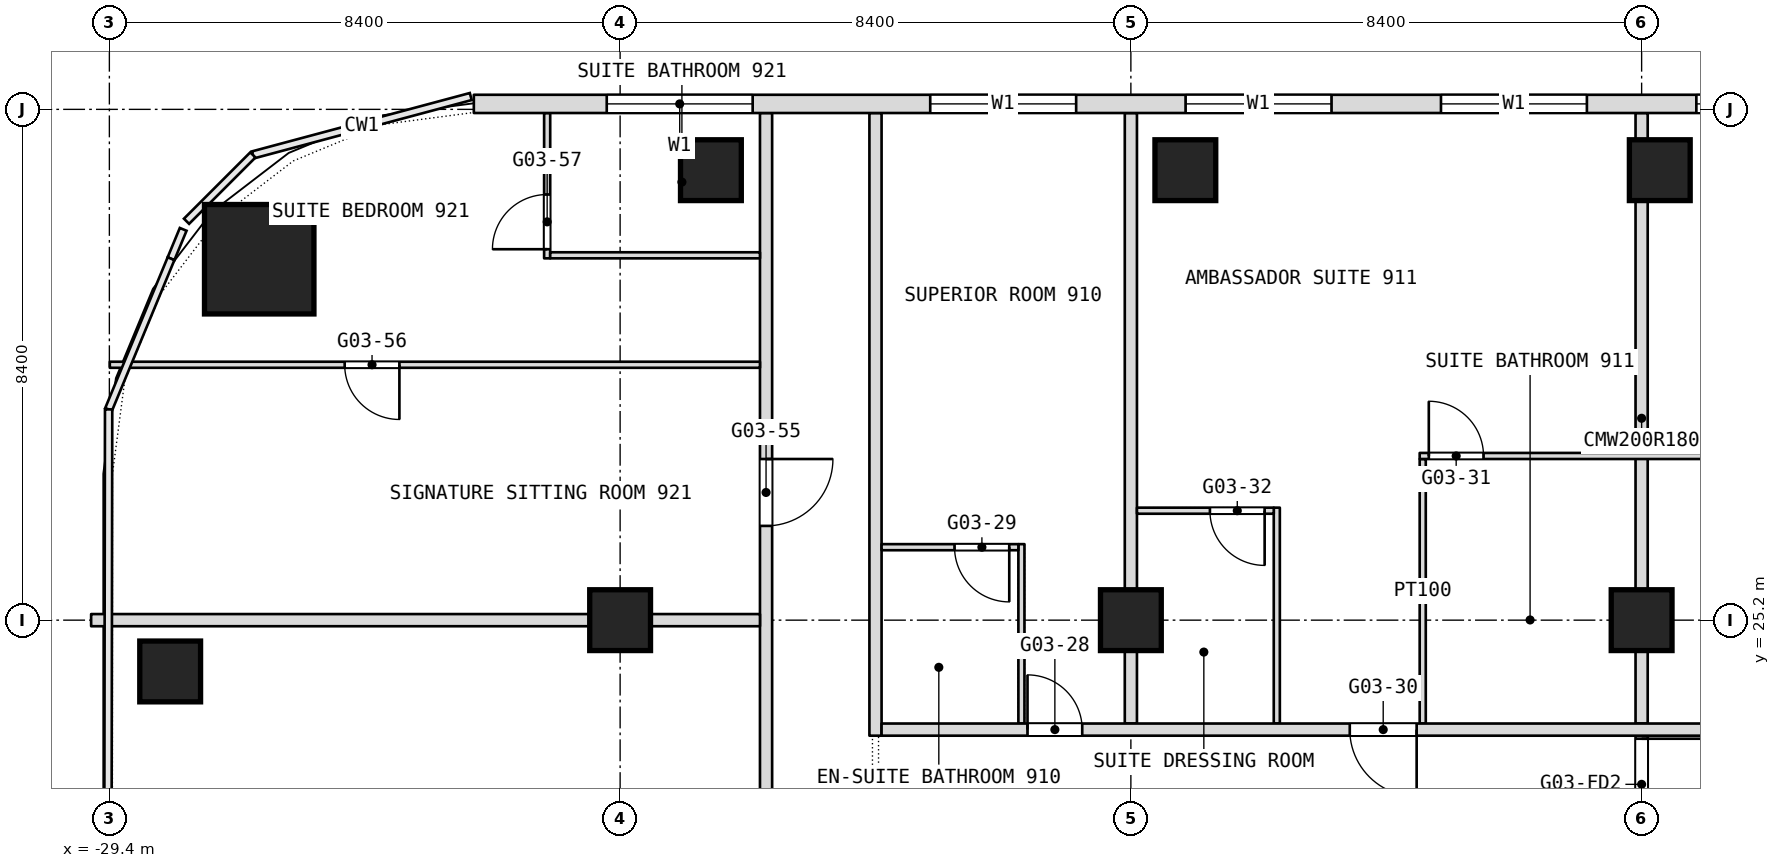
"""IFC4 building model, lengths in metres.
Left out: names, types, materials, properties, quantities, classifications, styles, units other than length and angle.
Written with IfcOpenShell. Run it as: python <this file> out.ifc"""

import sys

from ifc_helpers import new_model, si_unit, direction, frame, frame_2d, origin, origin_2d, place, context, subcontext, project, spatial, rectangle, extrude, element, fill, save


model = new_model("IFC4")
c1 = context("Model", 3, precision=1e-05, world=origin(), true_north=direction((0.0, 1.0)))
c2 = subcontext(c1, "Body", "Model", "MODEL_VIEW")
j1 = project(units=[si_unit("LENGTHUNIT", "METRE"), si_unit("PLANEANGLEUNIT", "RADIAN")], contexts=[c1])
p1 = place(None, origin())
s1 = spatial("IfcSite", under=j1, at=p1, CompositionType="ELEMENT")
p2 = place(p1, origin())
s2 = spatial("IfcBuilding", under=s1, at=p2, CompositionType="ELEMENT")
p3 = place(p2, frame((0.0, 0.0, 47.3)))
s3 = spatial("IfcBuildingStorey", under=s2, at=p3, CompositionType="ELEMENT", Elevation=47.3)
p4 = place(p3, frame((-26.936, 31.135, 0.0), z_axis=(0.0, 0.0, 1.0), x_axis=(1.0, 0.0, 0.0)))
e1 = element("IfcColumn", 1, at=p4, inside=s3, PredefinedType="COLUMN", context=c2, shape_type="SweptSolid", body=[
    extrude(rectangle(XDim=1.8, YDim=1.8, at=origin_2d()), origin(), (0.0, 0.0, 1.0), 3.6),
])
for number, where, z_axis, x_axis in (
    (2, (-21.0, 25.2, 0.0), (0.0, 0.0, 1.0), (1.0, 0.0, 0.0)),
    (3, (-12.6, 25.2, 0.0), (0.0, 0.0, 1.0), (1.0, 0.0, 0.0)),
    (4, (-4.2, 25.2, 0.0), (0.0, 0.0, 1.0), (1.0, 0.0, 0.0)),
    (5, (-28.4, 24.356, 0.0), (0.0, 0.0, 1.0), (1.0, 0.0, 0.0)),
    (6, (-19.507, 32.6, 0.0), (0.0, 0.0, 1.0), (1.0, 0.0, 0.0)),
    (7, (-11.704, 32.6, 0.0), (0.0, 0.0, 1.0), (1.0, 0.0, 0.0)),
    (8, (-3.901, 32.6, 0.0), (0.0, 0.0, 1.0), (1.0, 0.0, 0.0)),
):
    element("IfcColumn", number, at=place(p3, frame(where, z_axis=z_axis, x_axis=x_axis)), inside=s3, PredefinedType="COLUMN", context=c2, shape_type="SweptSolid", body=[
        extrude(rectangle(XDim=1.0, YDim=1.0, at=origin_2d()), origin(), (0.0, 0.0, 1.0), 3.6),
    ])
p5 = place(p3, frame((-4.2, 16.8, 0.0), z_axis=(0.0, 0.0, 1.0), x_axis=(0.0, 1.0, 0.0)))
e9 = element("IfcWall", 9, at=p5, inside=s3, PredefinedType="PARTITIONING", context=c2, shape_type="SweptSolid", body=[
    extrude(rectangle(XDim=6.7, YDim=0.2, at=frame_2d((3.35, 0.0))), origin(), (0.0, 0.0, 1.0), 3.34),
])
p6 = place(p5, frame((0.15, 0.0, 0.0)))
e10 = element("IfcOpeningElement", 10, at=p6, cuts=e9, PredefinedType="OPENING", context=c2, shape_type="SweptSolid", body=[
    extrude(rectangle(XDim=1.5, YDim=2.1, at=frame_2d((0.75, 1.05))), frame((0.0, 0.1, 0.0), z_axis=(0.0, -1.0, 0.0), x_axis=(1.0, 0.0, 0.0)), (0.0, 0.0, 1.0), 0.2),
])
p7 = place(p5, frame((4.95, 0.0, 0.0)))
e11 = element("IfcOpeningElement", 11, at=p7, cuts=e9, PredefinedType="OPENING", context=c2, shape_type="SweptSolid", body=[
    extrude(rectangle(XDim=1.5, YDim=2.1, at=frame_2d((0.75, 1.05))), frame((0.0, 0.1, 0.0), z_axis=(0.0, -1.0, 0.0), x_axis=(1.0, 0.0, 0.0)), (0.0, 0.0, 1.0), 0.2),
])
p8 = place(p3, frame((-4.2, 23.5, 0.0), z_axis=(0.0, 0.0, 1.0), x_axis=(0.0, 1.0, 0.0)))
e12 = element("IfcWall", 12, at=p8, inside=s3, PredefinedType="PARTITIONING", context=c2, shape_type="SweptSolid", body=[
    extrude(rectangle(XDim=10.04, YDim=0.2, at=frame_2d((5.02, 0.0))), origin(), (0.0, 0.0, 1.0), 3.34),
])
p9 = place(p3, frame((-7.8, 23.5, 0.0), z_axis=(0.0, 0.0, 1.0), x_axis=(0.0, 1.0, 0.0)))
e13 = element("IfcWall", 13, at=p9, inside=s3, PredefinedType="PARTITIONING", context=c2, shape_type="SweptSolid", body=[
    extrude(rectangle(XDim=4.35, YDim=0.1, at=frame_2d((2.175, 0.0))), origin(), (0.0, 0.0, 1.0), 3.34),
])
p10 = place(p3, frame((-10.2, 23.5, 0.0), z_axis=(0.0, 0.0, 1.0), x_axis=(0.0, 1.0, 0.0)))
e14 = element("IfcWall", 14, at=p10, inside=s3, PredefinedType="PARTITIONING", context=c2, shape_type="SweptSolid", body=[
    extrude(rectangle(XDim=3.55, YDim=0.1, at=frame_2d((1.775, 0.0))), origin(), (0.0, 0.0, 1.0), 3.34),
])
p11 = place(p3, frame((-12.6, 23.5, 0.0), z_axis=(0.0, 0.0, 1.0), x_axis=(0.0, 1.0, 0.0)))
e15 = element("IfcWall", 15, at=p11, inside=s3, PredefinedType="PARTITIONING", context=c2, shape_type="SweptSolid", body=[
    extrude(rectangle(XDim=10.04, YDim=0.2, at=frame_2d((5.02, 0.0))), origin(), (0.0, 0.0, 1.0), 3.34),
])
p12 = place(p3, frame((-14.4, 23.5, 0.0), z_axis=(0.0, 0.0, 1.0), x_axis=(0.0, 1.0, 0.0)))
e16 = element("IfcWall", 16, at=p12, inside=s3, PredefinedType="PARTITIONING", context=c2, shape_type="SweptSolid", body=[
    extrude(rectangle(XDim=2.95, YDim=0.1, at=frame_2d((1.475, 0.0))), origin(), (0.0, 0.0, 1.0), 3.34),
])
p13 = place(p3, frame((-16.8, 23.3, 0.0), z_axis=(0.0, 0.0, 1.0), x_axis=(0.0, 1.0, 0.0)))
e17 = element("IfcWall", 17, at=p13, inside=s3, PredefinedType="PARTITIONING", context=c2, shape_type="SweptSolid", body=[
    extrude(rectangle(XDim=10.24, YDim=0.2, at=frame_2d((5.12, 0.0))), origin(), (0.0, 0.0, 1.0), 3.34),
])
p14 = place(p3, frame((-18.6, 18.5, 0.0), z_axis=(0.0, 0.0, 1.0), x_axis=(0.0, 1.0, 0.0)))
e18 = element("IfcWall", 18, at=p14, inside=s3, PredefinedType="PARTITIONING", context=c2, shape_type="SweptSolid", body=[
    extrude(rectangle(XDim=15.04, YDim=0.2, at=frame_2d((7.52, 0.0))), origin(), (0.0, 0.0, 1.0), 3.34),
])
p15 = place(p14, frame((8.25, 0.0, 0.0)))
e19 = element("IfcOpeningElement", 19, at=p15, cuts=e18, PredefinedType="OPENING", context=c2, shape_type="SweptSolid", body=[
    extrude(rectangle(XDim=1.1, YDim=2.1, at=frame_2d((0.55, 1.05))), frame((0.0, 0.1, 0.0), z_axis=(0.0, -1.0, 0.0), x_axis=(1.0, 0.0, 0.0)), (0.0, 0.0, 1.0), 0.2),
])
p16 = place(p3, frame((-22.2, 31.15, 0.0), z_axis=(0.0, 0.0, 1.0), x_axis=(0.0, 1.0, 0.0)))
e20 = element("IfcWall", 20, at=p16, inside=s3, PredefinedType="PARTITIONING", context=c2, shape_type="SweptSolid", body=[
    extrude(rectangle(XDim=2.39, YDim=0.1, at=frame_2d((1.195, 0.0))), origin(), (0.0, 0.0, 1.0), 3.34),
])
p17 = place(p16, frame((0.15, 0.0, 0.0)))
e21 = element("IfcOpeningElement", 21, at=p17, cuts=e20, PredefinedType="OPENING", context=c2, shape_type="SweptSolid", body=[
    extrude(rectangle(XDim=0.9, YDim=2.1, at=frame_2d((0.45, 1.05))), frame((0.0, 0.05, 0.0), z_axis=(0.0, -1.0, 0.0), x_axis=(1.0, 0.0, 0.0)), (0.0, 0.0, 1.0), 0.1),
])
p18 = place(p3, frame((-16.7, 23.4, 0.0), z_axis=(0.0, 0.0, 1.0), x_axis=(1.0, 0.0, 0.0)))
e22 = element("IfcWall", 22, at=p18, inside=s3, PredefinedType="PARTITIONING", context=c2, shape_type="SweptSolid", body=[
    extrude(rectangle(XDim=21.0, YDim=0.2, at=frame_2d((10.5, 0.0))), origin(), (0.0, 0.0, 1.0), 3.34),
])
p19 = place(p18, frame((2.4, 0.0, 0.0)))
e23 = element("IfcOpeningElement", 23, at=p19, cuts=e22, PredefinedType="OPENING", context=c2, shape_type="SweptSolid", body=[
    extrude(rectangle(XDim=0.9, YDim=2.1, at=frame_2d((0.45, 1.05))), frame((0.0, 0.1, 0.0), z_axis=(0.0, -1.0, 0.0), x_axis=(1.0, 0.0, 0.0)), (0.0, 0.0, 1.0), 0.2),
])
p20 = place(p18, frame((7.7, 0.0, 0.0)))
e24 = element("IfcOpeningElement", 24, at=p20, cuts=e22, PredefinedType="OPENING", context=c2, shape_type="SweptSolid", body=[
    extrude(rectangle(XDim=1.1, YDim=2.1, at=frame_2d((0.55, 1.05))), frame((0.0, 0.1, 0.0), z_axis=(0.0, -1.0, 0.0), x_axis=(1.0, 0.0, 0.0)), (0.0, 0.0, 1.0), 0.2),
])
p21 = place(p18, frame((16.2, 0.0, 0.0)))
e25 = element("IfcOpeningElement", 25, at=p21, cuts=e22, PredefinedType="OPENING", context=c2, shape_type="SweptSolid", body=[
    extrude(rectangle(XDim=1.1, YDim=2.1, at=frame_2d((0.55, 1.05))), frame((0.0, 0.1, 0.0), z_axis=(0.0, -1.0, 0.0), x_axis=(1.0, 0.0, 0.0)), (0.0, 0.0, 1.0), 0.2),
])
p22 = place(p3, frame((-29.7, 25.2, 0.0), z_axis=(0.0, 0.0, 1.0), x_axis=(1.0, 0.0, 0.0)))
e26 = element("IfcWall", 26, at=p22, inside=s3, PredefinedType="PARTITIONING", context=c2, shape_type="SweptSolid", body=[
    extrude(rectangle(XDim=11.0, YDim=0.2, at=frame_2d((5.5, 0.0))), origin(), (0.0, 0.0, 1.0), 2.84),
])
p23 = place(p3, frame((-16.7, 26.4, 0.0), z_axis=(0.0, 0.0, 1.0), x_axis=(1.0, 0.0, 0.0)))
e27 = element("IfcWall", 27, at=p23, inside=s3, PredefinedType="PARTITIONING", context=c2, shape_type="SweptSolid", body=[
    extrude(rectangle(XDim=2.25, YDim=0.1, at=frame_2d((1.125, 0.0))), origin(), (0.0, 0.0, 1.0), 3.34),
])
p24 = place(p23, frame((1.2, 0.0, 0.0)))
e28 = element("IfcOpeningElement", 28, at=p24, cuts=e27, PredefinedType="OPENING", context=c2, shape_type="SweptSolid", body=[
    extrude(rectangle(XDim=0.9, YDim=2.1, at=frame_2d((0.45, 1.05))), frame((0.0, 0.05, 0.0), z_axis=(0.0, -1.0, 0.0), x_axis=(1.0, 0.0, 0.0)), (0.0, 0.0, 1.0), 0.1),
])
p25 = place(p3, frame((-12.5, 27.0, 0.0), z_axis=(0.0, 0.0, 1.0), x_axis=(1.0, 0.0, 0.0)))
e29 = element("IfcWall", 29, at=p25, inside=s3, PredefinedType="PARTITIONING", context=c2, shape_type="SweptSolid", body=[
    extrude(rectangle(XDim=2.25, YDim=0.1, at=frame_2d((1.125, 0.0))), origin(), (0.0, 0.0, 1.0), 3.34),
])
p26 = place(p25, frame((1.2, 0.0, 0.0)))
e30 = element("IfcOpeningElement", 30, at=p26, cuts=e29, PredefinedType="OPENING", context=c2, shape_type="SweptSolid", body=[
    extrude(rectangle(XDim=0.9, YDim=2.1, at=frame_2d((0.45, 1.05))), frame((0.0, 0.05, 0.0), z_axis=(0.0, -1.0, 0.0), x_axis=(1.0, 0.0, 0.0)), (0.0, 0.0, 1.0), 0.1),
])
p27 = place(p3, frame((-7.85, 27.9, 0.0), z_axis=(0.0, 0.0, 1.0), x_axis=(1.0, 0.0, 0.0)))
e31 = element("IfcWall", 31, at=p27, inside=s3, PredefinedType="PARTITIONING", context=c2, shape_type="SweptSolid", body=[
    extrude(rectangle(XDim=7.2, YDim=0.1, at=frame_2d((3.6, 0.0))), origin(), (0.0, 0.0, 1.0), 3.34),
])
p28 = place(p27, frame((0.15, 0.0, 0.0)))
e32 = element("IfcOpeningElement", 32, at=p28, cuts=e31, PredefinedType="OPENING", context=c2, shape_type="SweptSolid", body=[
    extrude(rectangle(XDim=0.9, YDim=2.1, at=frame_2d((0.45, 1.05))), frame((0.0, 0.05, 0.0), z_axis=(0.0, -1.0, 0.0), x_axis=(1.0, 0.0, 0.0)), (0.0, 0.0, 1.0), 0.1),
])
p29 = place(p27, frame((6.15, 0.0, 0.0)))
e33 = element("IfcOpeningElement", 33, at=p29, cuts=e31, PredefinedType="OPENING", context=c2, shape_type="SweptSolid", body=[
    extrude(rectangle(XDim=0.9, YDim=2.1, at=frame_2d((0.45, 1.05))), frame((0.0, 0.05, 0.0), z_axis=(0.0, -1.0, 0.0), x_axis=(1.0, 0.0, 0.0)), (0.0, 0.0, 1.0), 0.1),
])
p30 = place(p3, frame((-29.393, 29.4, 0.0), z_axis=(0.0, 0.0, 1.0), x_axis=(1.0, 0.0, 0.0)))
e34 = element("IfcWall", 34, at=p30, inside=s3, PredefinedType="PARTITIONING", context=c2, shape_type="SweptSolid", body=[
    extrude(rectangle(XDim=10.693, YDim=0.1, at=frame_2d((5.347, 0.0))), origin(), (0.0, 0.0, 1.0), 3.34),
])
p31 = place(p30, frame((3.863, 0.0, 0.0)))
e35 = element("IfcOpeningElement", 35, at=p31, cuts=e34, PredefinedType="OPENING", context=c2, shape_type="SweptSolid", body=[
    extrude(rectangle(XDim=0.9, YDim=2.1, at=frame_2d((0.45, 1.05))), frame((0.0, 0.05, 0.0), z_axis=(0.0, -1.0, 0.0), x_axis=(1.0, 0.0, 0.0)), (0.0, 0.0, 1.0), 0.1),
])
p32 = place(p3, frame((-22.15, 31.2, 0.0), z_axis=(0.0, 0.0, 1.0), x_axis=(1.0, 0.0, 0.0)))
e36 = element("IfcWall", 36, at=p32, inside=s3, PredefinedType="PARTITIONING", context=c2, shape_type="SweptSolid", body=[
    extrude(rectangle(XDim=3.45, YDim=0.1, at=frame_2d((1.725, 0.0))), origin(), (0.0, 0.0, 1.0), 3.34),
])
p33 = place(p3, frame((23.406, 33.69, 0.0), z_axis=(0.0, 0.0, 1.0), x_axis=(-1.0, 0.0, 0.0)))
e37 = element("IfcWall", 37, at=p33, inside=s3, PredefinedType="NOTDEFINED", context=c2, shape_type="SweptSolid", body=[
    extrude(rectangle(XDim=46.812, YDim=0.3, at=frame_2d((23.406, 0.0))), origin(), (0.0, 0.0, 1.0), 3.6),
])
p34 = place(p33, frame((2.186, 0.0, 0.9)))
e38 = element("IfcOpeningElement", 38, at=p34, cuts=e37, PredefinedType="OPENING", context=c2, shape_type="SweptSolid", body=[
    extrude(rectangle(XDim=2.4, YDim=2.1, at=frame_2d((1.2, 1.05))), frame((0.0, 0.15, 0.0), z_axis=(0.0, -1.0, 0.0), x_axis=(1.0, 0.0, 0.0)), (0.0, 0.0, 1.0), 0.3),
])
p35 = place(p33, frame((7.506, 0.0, 0.9)))
e39 = element("IfcOpeningElement", 39, at=p35, cuts=e37, PredefinedType="OPENING", context=c2, shape_type="SweptSolid", body=[
    extrude(rectangle(XDim=2.4, YDim=2.1, at=frame_2d((1.2, 1.05))), frame((0.0, 0.15, 0.0), z_axis=(0.0, -1.0, 0.0), x_axis=(1.0, 0.0, 0.0)), (0.0, 0.0, 1.0), 0.3),
])
p36 = place(p33, frame((11.706, 0.0, 0.9)))
e40 = element("IfcOpeningElement", 40, at=p36, cuts=e37, PredefinedType="OPENING", context=c2, shape_type="SweptSolid", body=[
    extrude(rectangle(XDim=2.4, YDim=2.1, at=frame_2d((1.2, 1.05))), frame((0.0, 0.15, 0.0), z_axis=(0.0, -1.0, 0.0), x_axis=(1.0, 0.0, 0.0)), (0.0, 0.0, 1.0), 0.3),
])
p37 = place(p33, frame((15.906, 0.0, 0.9)))
e41 = element("IfcOpeningElement", 41, at=p37, cuts=e37, PredefinedType="OPENING", context=c2, shape_type="SweptSolid", body=[
    extrude(rectangle(XDim=2.4, YDim=2.1, at=frame_2d((1.2, 1.05))), frame((0.0, 0.15, 0.0), z_axis=(0.0, -1.0, 0.0), x_axis=(1.0, 0.0, 0.0)), (0.0, 0.0, 1.0), 0.3),
])
p38 = place(p33, frame((20.106, 0.0, 0.9)))
e42 = element("IfcOpeningElement", 42, at=p38, cuts=e37, PredefinedType="OPENING", context=c2, shape_type="SweptSolid", body=[
    extrude(rectangle(XDim=2.4, YDim=2.1, at=frame_2d((1.2, 1.05))), frame((0.0, 0.15, 0.0), z_axis=(0.0, -1.0, 0.0), x_axis=(1.0, 0.0, 0.0)), (0.0, 0.0, 1.0), 0.3),
])
p39 = place(p33, frame((24.306, 0.0, 0.9)))
e43 = element("IfcOpeningElement", 43, at=p39, cuts=e37, PredefinedType="OPENING", context=c2, shape_type="SweptSolid", body=[
    extrude(rectangle(XDim=2.4, YDim=2.1, at=frame_2d((1.2, 1.05))), frame((0.0, 0.15, 0.0), z_axis=(0.0, -1.0, 0.0), x_axis=(1.0, 0.0, 0.0)), (0.0, 0.0, 1.0), 0.3),
])
p40 = place(p33, frame((28.506, 0.0, 0.9)))
e44 = element("IfcOpeningElement", 44, at=p40, cuts=e37, PredefinedType="OPENING", context=c2, shape_type="SweptSolid", body=[
    extrude(rectangle(XDim=2.4, YDim=2.1, at=frame_2d((1.2, 1.05))), frame((0.0, 0.15, 0.0), z_axis=(0.0, -1.0, 0.0), x_axis=(1.0, 0.0, 0.0)), (0.0, 0.0, 1.0), 0.3),
])
p41 = place(p33, frame((32.706, 0.0, 0.9)))
e45 = element("IfcOpeningElement", 45, at=p41, cuts=e37, PredefinedType="OPENING", context=c2, shape_type="SweptSolid", body=[
    extrude(rectangle(XDim=2.4, YDim=2.1, at=frame_2d((1.2, 1.05))), frame((0.0, 0.15, 0.0), z_axis=(0.0, -1.0, 0.0), x_axis=(1.0, 0.0, 0.0)), (0.0, 0.0, 1.0), 0.3),
])
p42 = place(p33, frame((36.906, 0.0, 0.9)))
e46 = element("IfcOpeningElement", 46, at=p42, cuts=e37, PredefinedType="OPENING", context=c2, shape_type="SweptSolid", body=[
    extrude(rectangle(XDim=2.4, YDim=2.1, at=frame_2d((1.2, 1.05))), frame((0.0, 0.15, 0.0), z_axis=(0.0, -1.0, 0.0), x_axis=(1.0, 0.0, 0.0)), (0.0, 0.0, 1.0), 0.3),
])
p43 = place(p33, frame((42.226, 0.0, 0.9)))
e47 = element("IfcOpeningElement", 47, at=p43, cuts=e37, PredefinedType="OPENING", context=c2, shape_type="SweptSolid", body=[
    extrude(rectangle(XDim=2.4, YDim=2.1, at=frame_2d((1.2, 1.05))), frame((0.0, 0.15, 0.0), z_axis=(0.0, -1.0, 0.0), x_axis=(1.0, 0.0, 0.0)), (0.0, 0.0, 1.0), 0.3),
])
p44 = place(p15, origin())
e48 = element("IfcDoor", 48, at=p44, inside=s3, OperationType="SINGLE_SWING_RIGHT", PredefinedType="DOOR", context=c2, shape_type="SweptSolid", body=[
    extrude(rectangle(XDim=1.1, YDim=2.1, at=frame_2d((0.55, 1.05))), frame((0.0, 0.025, 0.0), z_axis=(0.0, -1.0, 0.0), x_axis=(1.0, 0.0, 0.0)), (0.0, 0.0, 1.0), 0.05),
])
fill(e19, e48)
p45 = place(p17, origin())
e49 = element("IfcDoor", 49, at=p45, inside=s3, OperationType="SINGLE_SWING_RIGHT", PredefinedType="DOOR", context=c2, shape_type="SweptSolid", body=[
    extrude(rectangle(XDim=0.9, YDim=2.1, at=frame_2d((0.45, 1.05))), frame((0.0, 0.025, 0.0), z_axis=(0.0, -1.0, 0.0), x_axis=(1.0, 0.0, 0.0)), (0.0, 0.0, 1.0), 0.05),
])
fill(e21, e49)
p46 = place(p19, origin())
e50 = element("IfcDoor", 50, at=p46, inside=s3, OperationType="SINGLE_SWING_LEFT", PredefinedType="DOOR", context=c2, shape_type="SweptSolid", body=[
    extrude(rectangle(XDim=0.9, YDim=2.1, at=frame_2d((0.45, 1.05))), frame((0.0, 0.025, 0.0), z_axis=(0.0, -1.0, 0.0), x_axis=(1.0, 0.0, 0.0)), (0.0, 0.0, 1.0), 0.05),
])
fill(e23, e50)
p47 = place(p20, origin())
e51 = element("IfcDoor", 51, at=p47, inside=s3, OperationType="SINGLE_SWING_RIGHT", PredefinedType="DOOR", context=c2, shape_type="SweptSolid", body=[
    extrude(rectangle(XDim=1.1, YDim=2.1, at=frame_2d((0.55, 1.05))), frame((0.0, 0.025, 0.0), z_axis=(0.0, -1.0, 0.0), x_axis=(1.0, 0.0, 0.0)), (0.0, 0.0, 1.0), 0.05),
])
fill(e24, e51)
p48 = place(p24, origin())
e52 = element("IfcDoor", 52, at=p48, inside=s3, OperationType="SINGLE_SWING_LEFT", PredefinedType="DOOR", context=c2, shape_type="SweptSolid", body=[
    extrude(rectangle(XDim=0.9, YDim=2.1, at=frame_2d((0.45, 1.05))), frame((0.0, 0.025, 0.0), z_axis=(0.0, -1.0, 0.0), x_axis=(1.0, 0.0, 0.0)), (0.0, 0.0, 1.0), 0.05),
])
fill(e28, e52)
p49 = place(p26, origin())
e53 = element("IfcDoor", 53, at=p49, inside=s3, OperationType="SINGLE_SWING_LEFT", PredefinedType="DOOR", context=c2, shape_type="SweptSolid", body=[
    extrude(rectangle(XDim=0.9, YDim=2.1, at=frame_2d((0.45, 1.05))), frame((0.0, 0.025, 0.0), z_axis=(0.0, -1.0, 0.0), x_axis=(1.0, 0.0, 0.0)), (0.0, 0.0, 1.0), 0.05),
])
fill(e30, e53)
p50 = place(p28, origin())
e54 = element("IfcDoor", 54, at=p50, inside=s3, OperationType="SINGLE_SWING_RIGHT", PredefinedType="DOOR", context=c2, shape_type="SweptSolid", body=[
    extrude(rectangle(XDim=0.9, YDim=2.1, at=frame_2d((0.45, 1.05))), frame((0.0, 0.025, 0.0), z_axis=(0.0, -1.0, 0.0), x_axis=(1.0, 0.0, 0.0)), (0.0, 0.0, 1.0), 0.05),
])
fill(e32, e54)
p51 = place(p31, origin())
e55 = element("IfcDoor", 55, at=p51, inside=s3, OperationType="SINGLE_SWING_LEFT", PredefinedType="DOOR", context=c2, shape_type="SweptSolid", body=[
    extrude(rectangle(XDim=0.9, YDim=2.1, at=frame_2d((0.45, 1.05))), frame((0.0, 0.025, 0.0), z_axis=(0.0, -1.0, 0.0), x_axis=(1.0, 0.0, 0.0)), (0.0, 0.0, 1.0), 0.05),
])
fill(e35, e55)
p52 = place(p39, origin())
e56 = element("IfcWindow", 56, at=p52, inside=s3, PartitioningType="SINGLE_PANEL", PredefinedType="WINDOW", context=c2, shape_type="SweptSolid", body=[
    extrude(rectangle(XDim=2.4, YDim=2.1, at=frame_2d((1.2, 1.05))), frame((0.0, 0.03, 0.0), z_axis=(0.0, -1.0, 0.0), x_axis=(1.0, 0.0, 0.0)), (0.0, 0.0, 1.0), 0.06),
])
fill(e43, e56)
p53 = place(p40, origin())
e57 = element("IfcWindow", 57, at=p53, inside=s3, PartitioningType="SINGLE_PANEL", PredefinedType="WINDOW", context=c2, shape_type="SweptSolid", body=[
    extrude(rectangle(XDim=2.4, YDim=2.1, at=frame_2d((1.2, 1.05))), frame((0.0, 0.03, 0.0), z_axis=(0.0, -1.0, 0.0), x_axis=(1.0, 0.0, 0.0)), (0.0, 0.0, 1.0), 0.06),
])
fill(e44, e57)
p54 = place(p41, origin())
e58 = element("IfcWindow", 58, at=p54, inside=s3, PartitioningType="SINGLE_PANEL", PredefinedType="WINDOW", context=c2, shape_type="SweptSolid", body=[
    extrude(rectangle(XDim=2.4, YDim=2.1, at=frame_2d((1.2, 1.05))), frame((0.0, 0.03, 0.0), z_axis=(0.0, -1.0, 0.0), x_axis=(1.0, 0.0, 0.0)), (0.0, 0.0, 1.0), 0.06),
])
fill(e45, e58)
p55 = place(p42, origin())
e59 = element("IfcWindow", 59, at=p55, inside=s3, PartitioningType="SINGLE_PANEL", PredefinedType="WINDOW", context=c2, shape_type="SweptSolid", body=[
    extrude(rectangle(XDim=2.4, YDim=2.1, at=frame_2d((1.2, 1.05))), frame((0.0, 0.03, 0.0), z_axis=(0.0, -1.0, 0.0), x_axis=(1.0, 0.0, 0.0)), (0.0, 0.0, 1.0), 0.06),
])
fill(e46, e59)
p56 = place(p43, origin())
e60 = element("IfcWindow", 60, at=p56, inside=s3, PartitioningType="SINGLE_PANEL", PredefinedType="WINDOW", context=c2, shape_type="SweptSolid", body=[
    extrude(rectangle(XDim=2.4, YDim=2.1, at=frame_2d((1.2, 1.05))), frame((0.0, 0.03, 0.0), z_axis=(0.0, -1.0, 0.0), x_axis=(1.0, 0.0, 0.0)), (0.0, 0.0, 1.0), 0.06),
])
fill(e47, e60)
p57 = place(p7, origin())
e61 = element("IfcDoor", 61, at=p57, inside=s3, OperationType="DOUBLE_DOOR_DOUBLE_SWING", PredefinedType="DOOR", context=c2, shape_type="SweptSolid", body=[
    extrude(rectangle(XDim=1.5, YDim=2.1, at=frame_2d((0.75, 1.05))), frame((0.0, 0.025, 0.0), z_axis=(0.0, -1.0, 0.0), x_axis=(1.0, 0.0, 0.0)), (0.0, 0.0, 1.0), 0.05),
])
fill(e11, e61)
save(model, sys.argv[1])
